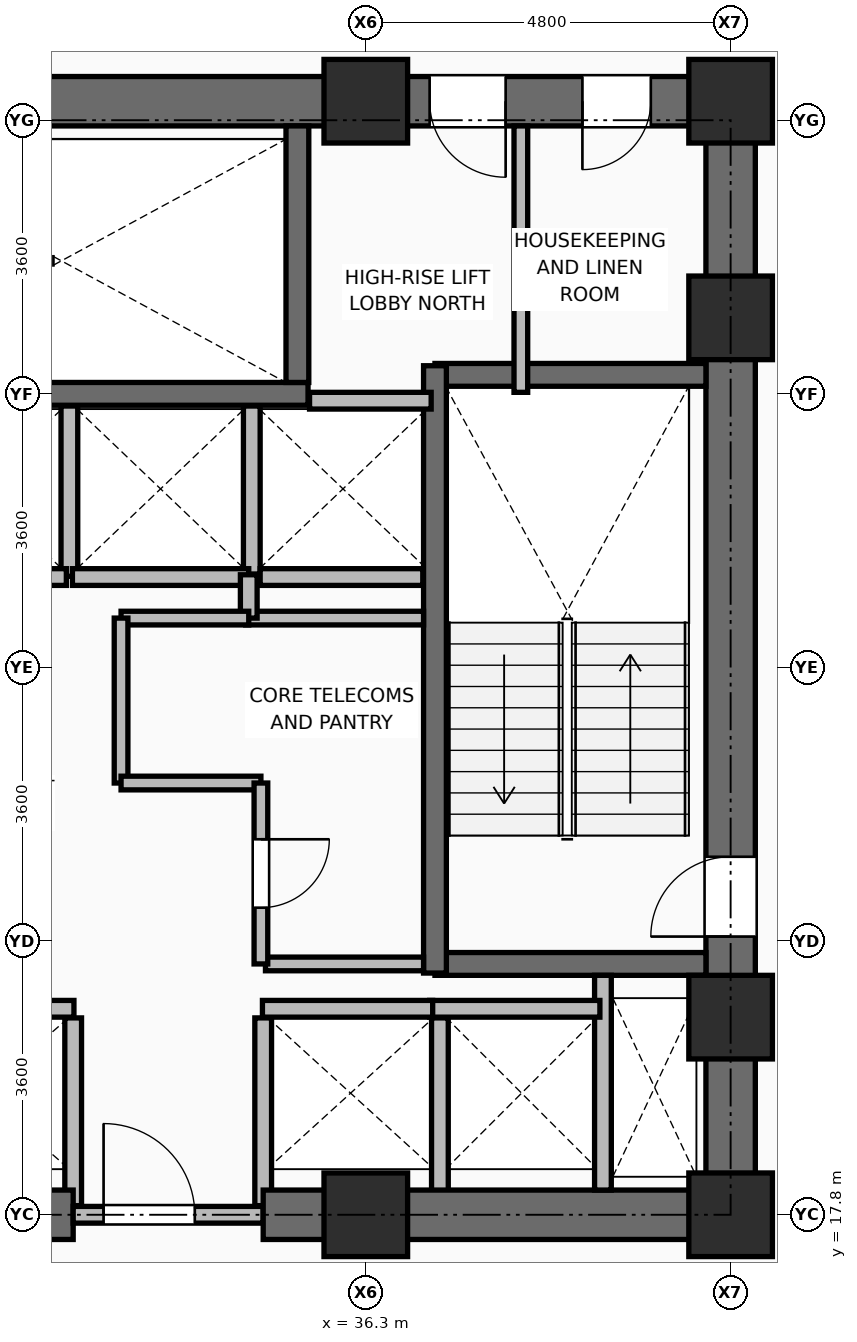
"""IFC4 building model, lengths in metres.
Left out: names, types, materials, properties, quantities, classifications, styles, units other than length and angle.
Written with IfcOpenShell. Run it as: python <this file> out.ifc"""

import sys

from ifc_helpers import new_model, si_unit, direction, frame, frame_2d, origin, origin_2d, place, context, subcontext, project, spatial, rectangle, extrude, element, fill, save


model = new_model("IFC4")
c1 = context("Model", 3, precision=1e-05, world=origin(), true_north=direction((0.0, 1.0)))
c2 = subcontext(c1, "Body", "Model", "MODEL_VIEW")
j1 = project(units=[si_unit("LENGTHUNIT", "METRE"), si_unit("PLANEANGLEUNIT", "RADIAN")], contexts=[c1])
p1 = place(None, origin())
s1 = spatial("IfcSite", under=j1, at=p1, CompositionType="ELEMENT")
p2 = place(p1, origin())
s2 = spatial("IfcBuilding", under=s1, at=p2, CompositionType="ELEMENT")
p3 = place(p2, frame((0.0, 0.0, 53.25)))
s3 = spatial("IfcBuildingStorey", under=s2, at=p3, CompositionType="ELEMENT", Elevation=53.25)
for number, where, z_axis, x_axis in (
    (1, (36.3, 17.8, 0.0), (0.0, 0.0, 1.0), (1.0, 0.0, 0.0)),
    (2, (41.1, 17.8, 0.0), (0.0, 0.0, 1.0), (1.0, 0.0, 0.0)),
    (3, (41.1, 20.4, 0.0), (0.0, 0.0, 1.0), (1.0, 0.0, 0.0)),
    (4, (41.1, 29.6, 0.0), (0.0, 0.0, 1.0), (1.0, 0.0, 0.0)),
    (5, (36.3, 32.45, 0.0), (0.0, 0.0, 1.0), (1.0, 0.0, 0.0)),
    (6, (41.1, 32.45, 0.0), (0.0, 0.0, 1.0), (1.0, 0.0, 0.0)),
):
    element("IfcColumn", number, at=place(p3, frame(where, z_axis=z_axis, x_axis=x_axis)), inside=s3, PredefinedType="COLUMN", context=c2, shape_type="SweptSolid", body=[
        extrude(rectangle(XDim=1.1, YDim=1.1, at=origin_2d()), origin(), (0.0, 0.0, 1.0), 3.75),
    ])
for number, where, z_axis, x_axis in (
    (7, (32.45, 17.92, 0.0), (0.0, 0.0, 1.0), (0.0, 1.0, 0.0)),
    (8, (34.95, 17.92, 0.0), (0.0, 0.0, 1.0), (0.0, 1.0, 0.0)),
):
    element("IfcWall", number, at=place(p3, frame(where, z_axis=z_axis, x_axis=x_axis)), inside=s3, PredefinedType="PARTITIONING", context=c2, shape_type="SweptSolid", body=[
        extrude(rectangle(XDim=2.47, YDim=0.22, at=frame_2d((1.235, 0.0))), origin(), (0.0, 0.0, 1.0), 2.928),
    ])
p4 = place(p3, frame((37.275, 18.08, 0.0), z_axis=(0.0, 0.0, 1.0), x_axis=(0.0, 1.0, 0.0)))
e9 = element("IfcWall", 9, at=p4, inside=s3, PredefinedType="PARTITIONING", context=c2, shape_type="SweptSolid", body=[
    extrude(rectangle(XDim=2.31, YDim=0.22, at=frame_2d((1.155, 0.0))), origin(), (0.0, 0.0, 1.0), 3.545),
])
p5 = place(p3, frame((32.4, 26.2, 0.0), z_axis=(0.0, 0.0, 1.0), x_axis=(0.0, 1.0, 0.0)))
e10 = element("IfcWall", 10, at=p5, inside=s3, PredefinedType="PARTITIONING", context=c2, shape_type="SweptSolid", body=[
    extrude(rectangle(XDim=2.24, YDim=0.22, at=frame_2d((1.12, 0.0))), origin(), (0.0, 0.0, 1.0), 3.545),
])
p6 = place(p3, frame((34.8, 26.23, 0.0), z_axis=(0.0, 0.0, 1.0), x_axis=(0.0, 1.0, 0.0)))
e11 = element("IfcWall", 11, at=p6, inside=s3, PredefinedType="PARTITIONING", context=c2, shape_type="SweptSolid", body=[
    extrude(rectangle(XDim=2.21, YDim=0.22, at=frame_2d((1.105, 0.0))), origin(), (0.0, 0.0, 1.0), 3.545),
])
p7 = place(p3, frame((34.91, 26.19, 0.0), z_axis=(0.0, 0.0, 1.0), x_axis=(1.0, 0.0, 0.0)))
e12 = element("IfcWall", 12, at=p7, inside=s3, PredefinedType="PARTITIONING", context=c2, shape_type="SweptSolid", body=[
    extrude(rectangle(XDim=2.14, YDim=0.22, at=frame_2d((1.07, 0.0))), origin(), (0.0, 0.0, 1.0), 3.545),
])
p8 = place(p3, frame((25.55, 17.8, 0.0), z_axis=(0.0, 0.0, 1.0), x_axis=(1.0, 0.0, 0.0)))
e13 = element("IfcWall", 13, at=p8, inside=s3, PredefinedType="SHEAR", context=c2, shape_type="SweptSolid", body=[
    extrude(rectangle(XDim=6.9, YDim=0.65, at=frame_2d((3.45, 0.0))), origin(), (0.0, 0.0, 1.0), 3.57),
])
p9 = place(p3, frame((32.45, 17.8, 0.0), z_axis=(0.0, 0.0, 1.0), x_axis=(1.0, 0.0, 0.0)))
e14 = element("IfcWall", 14, at=p9, inside=s3, PredefinedType="PARTITIONING", context=c2, shape_type="SweptSolid", body=[
    extrude(rectangle(XDim=2.5, YDim=0.22, at=frame_2d((1.25, 0.0))), origin(), (0.0, 0.0, 1.0), 2.928),
])
p10 = place(p9, frame((0.4, 0.0, 0.0)))
e15 = element("IfcOpeningElement", 15, at=p10, cuts=e14, PredefinedType="OPENING", context=c2, shape_type="SweptSolid", body=[
    extrude(rectangle(XDim=1.2, YDim=2.1, at=frame_2d((0.6, 1.05))), frame((0.0, 0.12, 0.0), z_axis=(0.0, -1.0, 0.0), x_axis=(1.0, 0.0, 0.0)), (0.0, 0.0, 1.0), 0.24),
])
p11 = place(p3, frame((34.95, 17.8, 0.0), z_axis=(0.0, 0.0, 1.0), x_axis=(1.0, 0.0, 0.0)))
e16 = element("IfcWall", 16, at=p11, inside=s3, PredefinedType="SHEAR", context=c2, shape_type="SweptSolid", body=[
    extrude(rectangle(XDim=6.475, YDim=0.65, at=frame_2d((3.238, 0.0))), origin(), (0.0, 0.0, 1.0), 3.57),
])
p12 = place(p3, frame((21.575, 32.45, 0.0), z_axis=(0.0, 0.0, 1.0), x_axis=(1.0, 0.0, 0.0)))
e17 = element("IfcWall", 17, at=p12, inside=s3, PredefinedType="SHEAR", context=c2, shape_type="SweptSolid", body=[
    extrude(rectangle(XDim=19.85, YDim=0.65, at=frame_2d((9.925, 0.0))), origin(), (0.0, 0.0, 1.0), 3.57),
])
p13 = place(p12, frame((2.175, 0.0, 0.0)))
e18 = element("IfcOpeningElement", 18, at=p13, cuts=e17, PredefinedType="OPENING", context=c2, shape_type="SweptSolid", body=[
    extrude(rectangle(XDim=1.1, YDim=2.1, at=frame_2d((0.55, 1.05))), frame((0.0, 0.335, 0.0), z_axis=(0.0, -1.0, 0.0), x_axis=(1.0, 0.0, 0.0)), (0.0, 0.0, 1.0), 0.67),
])
p14 = place(p12, frame((15.565, 0.0, 0.0)))
e19 = element("IfcOpeningElement", 19, at=p14, cuts=e17, PredefinedType="OPENING", context=c2, shape_type="SweptSolid", body=[
    extrude(rectangle(XDim=1.0, YDim=2.1, at=frame_2d((0.5, 1.05))), frame((0.0, 0.335, 0.0), z_axis=(0.0, -1.0, 0.0), x_axis=(1.0, 0.0, 0.0)), (0.0, 0.0, 1.0), 0.67),
])
p15 = place(p12, frame((17.575, 0.0, 0.0)))
e20 = element("IfcOpeningElement", 20, at=p15, cuts=e17, PredefinedType="OPENING", context=c2, shape_type="SweptSolid", body=[
    extrude(rectangle(XDim=0.9, YDim=2.1, at=frame_2d((0.45, 1.05))), frame((0.0, 0.335, 0.0), z_axis=(0.0, -1.0, 0.0), x_axis=(1.0, 0.0, 0.0)), (0.0, 0.0, 1.0), 0.67),
])
p16 = place(p3, frame((41.1, 18.125, 0.0), z_axis=(0.0, 0.0, 1.0), x_axis=(0.0, 1.0, 0.0)))
e21 = element("IfcWall", 21, at=p16, inside=s3, PredefinedType="SHEAR", context=c2, shape_type="SweptSolid", body=[
    extrude(rectangle(XDim=14.0, YDim=0.65, at=frame_2d((7.0, 0.0))), origin(), (0.0, 0.0, 1.0), 3.57),
])
p17 = place(p16, frame((3.335, 0.0, 0.0)))
e22 = element("IfcOpeningElement", 22, at=p17, cuts=e21, PredefinedType="OPENING", context=c2, shape_type="SweptSolid", body=[
    extrude(rectangle(XDim=1.05, YDim=2.1, at=frame_2d((0.525, 1.05))), frame((0.0, 0.335, 0.0), z_axis=(0.0, -1.0, 0.0), x_axis=(1.0, 0.0, 0.0)), (0.0, 0.0, 1.0), 0.67),
])
for number, where, z_axis, x_axis in (
    (23, (37.21, 21.1, 0.0), (0.0, 0.0, 1.0), (1.0, 0.0, 0.0)),
    (24, (37.21, 28.85, 0.0), (0.0, 0.0, 1.0), (1.0, 0.0, 0.0)),
):
    element("IfcWall", number, at=place(p3, frame(where, z_axis=z_axis, x_axis=x_axis)), inside=s3, PredefinedType="SHEAR", context=c2, shape_type="SweptSolid", body=[
        extrude(rectangle(XDim=3.565, YDim=0.3, at=frame_2d((1.782, 0.0))), origin(), (0.0, 0.0, 1.0), 3.57),
    ])
p18 = place(p3, frame((37.21, 20.98, 0.0), z_axis=(0.0, 0.0, 1.0), x_axis=(0.0, 1.0, 0.0)))
e25 = element("IfcWall", 25, at=p18, inside=s3, PredefinedType="SHEAR", context=c2, shape_type="SweptSolid", body=[
    extrude(rectangle(XDim=7.99, YDim=0.3, at=frame_2d((3.995, 0.0))), origin(), (0.0, 0.0, 1.0), 3.57),
])
p19 = place(p3, frame((27.51, 28.6, 0.0), z_axis=(0.0, 0.0, 1.0), x_axis=(1.0, 0.0, 0.0)))
e26 = element("IfcWall", 26, at=p19, inside=s3, PredefinedType="SHEAR", context=c2, shape_type="SweptSolid", body=[
    extrude(rectangle(XDim=8.03, YDim=0.3, at=frame_2d((4.015, 0.0))), origin(), (0.0, 0.0, 1.0), 3.57),
])
p20 = place(p3, frame((35.4, 28.75, 0.0), z_axis=(0.0, 0.0, 1.0), x_axis=(0.0, 1.0, 0.0)))
e27 = element("IfcWall", 27, at=p20, inside=s3, PredefinedType="SHEAR", context=c2, shape_type="SweptSolid", body=[
    extrude(rectangle(XDim=3.375, YDim=0.3, at=frame_2d((1.688, 0.0))), origin(), (0.0, 0.0, 1.0), 3.57),
])
p21 = place(p3, frame((39.42, 18.125, 0.0), z_axis=(0.0, 0.0, 1.0), x_axis=(0.0, 1.0, 0.0)))
e28 = element("IfcWall", 28, at=p21, inside=s3, PredefinedType="PARTITIONING", context=c2, shape_type="SweptSolid", body=[
    extrude(rectangle(XDim=2.825, YDim=0.22, at=frame_2d((1.413, 0.0))), origin(), (0.0, 0.0, 1.0), 3.55),
])
p22 = place(p3, frame((30.04, 20.51, 0.0), z_axis=(0.0, 0.0, 1.0), x_axis=(1.0, 0.0, 0.0)))
e29 = element("IfcWall", 29, at=p22, inside=s3, PredefinedType="PARTITIONING", context=c2, shape_type="SweptSolid", body=[
    extrude(rectangle(XDim=2.42, YDim=0.22, at=frame_2d((1.21, 0.0))), origin(), (0.0, 0.0, 1.0), 3.55),
])
for number, where, z_axis, x_axis in (
    (30, (37.14, 20.51, 0.0), (0.0, 0.0, 1.0), (1.0, 0.0, 0.0)),
    (31, (34.94, 20.51, 0.0), (0.0, 0.0, 1.0), (1.0, 0.0, 0.0)),
):
    element("IfcWall", number, at=place(p3, frame(where, z_axis=z_axis, x_axis=x_axis)), inside=s3, PredefinedType="PARTITIONING", context=c2, shape_type="SweptSolid", body=[
        extrude(rectangle(XDim=2.24, YDim=0.22, at=frame_2d((1.12, 0.0))), origin(), (0.0, 0.0, 1.0), 3.55),
    ])
for number, where, z_axis, x_axis in (
    (32, (30.04, 26.19, 0.0), (0.0, 0.0, 1.0), (1.0, 0.0, 0.0)),
    (33, (32.44, 26.19, 0.0), (0.0, 0.0, 1.0), (1.0, 0.0, 0.0)),
):
    element("IfcWall", number, at=place(p3, frame(where, z_axis=z_axis, x_axis=x_axis)), inside=s3, PredefinedType="PARTITIONING", context=c2, shape_type="SweptSolid", body=[
        extrude(rectangle(XDim=2.32, YDim=0.22, at=frame_2d((1.16, 0.0))), origin(), (0.0, 0.0, 1.0), 3.55),
    ])
p23 = place(p3, frame((35.56, 28.51, 0.0), z_axis=(0.0, 0.0, 1.0), x_axis=(1.0, 0.0, 0.0)))
e34 = element("IfcWall", 34, at=p23, inside=s3, PredefinedType="PARTITIONING", context=c2, shape_type="SweptSolid", body=[
    extrude(rectangle(XDim=1.6, YDim=0.22, at=frame_2d((0.8, 0.0))), origin(), (0.0, 0.0, 1.0), 3.55),
])
p24 = place(p3, frame((34.98, 21.1, 0.0), z_axis=(0.0, 0.0, 1.0), x_axis=(1.0, 0.0, 0.0)))
e35 = element("IfcWall", 35, at=p24, inside=s3, PredefinedType="PARTITIONING", context=c2, shape_type="SweptSolid", body=[
    extrude(rectangle(XDim=2.08, YDim=0.18, at=frame_2d((1.04, 0.0))), origin(), (0.0, 0.0, 1.0), 3.55),
])
p25 = place(p3, frame((34.72, 25.65, 0.0), z_axis=(0.0, 0.0, 1.0), x_axis=(1.0, 0.0, 0.0)))
e36 = element("IfcWall", 36, at=p25, inside=s3, PredefinedType="PARTITIONING", context=c2, shape_type="SweptSolid", body=[
    extrude(rectangle(XDim=2.34, YDim=0.18, at=frame_2d((1.17, 0.0))), origin(), (0.0, 0.0, 1.0), 3.55),
])
p26 = place(p3, frame((34.76, 25.65, 0.0), z_axis=(0.0, 0.0, 1.0), x_axis=(0.0, 1.0, 0.0)))
e37 = element("IfcWall", 37, at=p26, inside=s3, PredefinedType="PARTITIONING", context=c2, shape_type="SweptSolid", body=[
    extrude(rectangle(XDim=0.57, YDim=0.22, at=frame_2d((0.285, 0.0))), origin(), (0.0, 0.0, 1.0), 3.55),
])
p27 = place(p3, frame((33.08, 25.65, 0.0), z_axis=(0.0, 0.0, 1.0), x_axis=(1.0, 0.0, 0.0)))
e38 = element("IfcWall", 38, at=p27, inside=s3, PredefinedType="PARTITIONING", context=c2, shape_type="SweptSolid", body=[
    extrude(rectangle(XDim=1.68, YDim=0.18, at=frame_2d((0.84, 0.0))), origin(), (0.0, 0.0, 1.0), 3.55),
])
p28 = place(p3, frame((33.08, 23.48, 0.0), z_axis=(0.0, 0.0, 1.0), x_axis=(0.0, 1.0, 0.0)))
e39 = element("IfcWall", 39, at=p28, inside=s3, PredefinedType="PARTITIONING", context=c2, shape_type="SweptSolid", body=[
    extrude(rectangle(XDim=2.17, YDim=0.18, at=frame_2d((1.085, 0.0))), origin(), (0.0, 0.0, 1.0), 3.55),
])
p29 = place(p3, frame((33.08, 23.48, 0.0), z_axis=(0.0, 0.0, 1.0), x_axis=(1.0, 0.0, 0.0)))
e40 = element("IfcWall", 40, at=p29, inside=s3, PredefinedType="PARTITIONING", context=c2, shape_type="SweptSolid", body=[
    extrude(rectangle(XDim=1.84, YDim=0.18, at=frame_2d((0.92, 0.0))), origin(), (0.0, 0.0, 1.0), 3.55),
])
p30 = place(p3, frame((34.92, 21.1, 0.0), z_axis=(0.0, 0.0, 1.0), x_axis=(0.0, 1.0, 0.0)))
e41 = element("IfcWall", 41, at=p30, inside=s3, PredefinedType="PARTITIONING", context=c2, shape_type="SweptSolid", body=[
    extrude(rectangle(XDim=2.38, YDim=0.18, at=frame_2d((1.19, 0.0))), origin(), (0.0, 0.0, 1.0), 3.55),
])
p31 = place(p30, frame((0.74, 0.0, 0.0)))
e42 = element("IfcOpeningElement", 42, at=p31, cuts=e41, PredefinedType="OPENING", context=c2, shape_type="SweptSolid", body=[
    extrude(rectangle(XDim=0.9, YDim=2.1, at=frame_2d((0.45, 1.05))), frame((0.0, 0.1, 0.0), z_axis=(0.0, -1.0, 0.0), x_axis=(1.0, 0.0, 0.0)), (0.0, 0.0, 1.0), 0.2),
])
p32 = place(p3, frame((38.34, 28.62, 0.0), z_axis=(0.0, 0.0, 1.0), x_axis=(0.0, 1.0, 0.0)))
e43 = element("IfcWall", 43, at=p32, inside=s3, PredefinedType="PARTITIONING", context=c2, shape_type="SweptSolid", body=[
    extrude(rectangle(XDim=3.505, YDim=0.18, at=frame_2d((1.752, 0.0))), origin(), (0.0, 0.0, 1.0), 3.55),
])
p33 = place(p10, origin())
e44 = element("IfcDoor", 44, at=p33, inside=s3, OperationType="SINGLE_SWING_LEFT", PredefinedType="DOOR", context=c2, shape_type="SweptSolid", body=[
    extrude(rectangle(XDim=1.2, YDim=2.1, at=frame_2d((0.6, 1.05))), frame((0.0, 0.025, 0.0), z_axis=(0.0, -1.0, 0.0), x_axis=(1.0, 0.0, 0.0)), (0.0, 0.0, 1.0), 0.05),
])
fill(e15, e44)
p34 = place(p17, origin())
e45 = element("IfcDoor", 45, at=p34, inside=s3, OperationType="SINGLE_SWING_LEFT", PredefinedType="DOOR", context=c2, shape_type="SweptSolid", body=[
    extrude(rectangle(XDim=1.05, YDim=2.1, at=frame_2d((0.525, 1.05))), frame((0.0, 0.025, 0.0), z_axis=(0.0, -1.0, 0.0), x_axis=(1.0, 0.0, 0.0)), (0.0, 0.0, 1.0), 0.05),
])
fill(e22, e45)
p35 = place(p31, frame((0.9, 0.0, 0.0), z_axis=(0.0, 0.0, 1.0), x_axis=(-1.0, 0.0, 0.0)))
e46 = element("IfcDoor", 46, at=p35, inside=s3, OperationType="SINGLE_SWING_LEFT", PredefinedType="DOOR", context=c2, shape_type="SweptSolid", body=[
    extrude(rectangle(XDim=0.9, YDim=2.1, at=frame_2d((0.45, 1.05))), frame((0.0, 0.025, 0.0), z_axis=(0.0, -1.0, 0.0), x_axis=(1.0, 0.0, 0.0)), (0.0, 0.0, 1.0), 0.05),
])
fill(e42, e46)
p36 = place(p14, frame((1.0, 0.0, 0.0), z_axis=(0.0, 0.0, 1.0), x_axis=(-1.0, 0.0, 0.0)))
e47 = element("IfcDoor", 47, at=p36, inside=s3, OperationType="SINGLE_SWING_LEFT", PredefinedType="DOOR", context=c2, shape_type="SweptSolid", body=[
    extrude(rectangle(XDim=1.0, YDim=2.1, at=frame_2d((0.5, 1.05))), frame((0.0, 0.025, 0.0), z_axis=(0.0, -1.0, 0.0), x_axis=(1.0, 0.0, 0.0)), (0.0, 0.0, 1.0), 0.05),
])
fill(e19, e47)
p37 = place(p15, frame((0.9, 0.0, 0.0), z_axis=(0.0, 0.0, 1.0), x_axis=(-1.0, 0.0, 0.0)))
e48 = element("IfcDoor", 48, at=p37, inside=s3, OperationType="SINGLE_SWING_RIGHT", PredefinedType="DOOR", context=c2, shape_type="SweptSolid", body=[
    extrude(rectangle(XDim=0.9, YDim=2.1, at=frame_2d((0.45, 1.05))), frame((0.0, 0.025, 0.0), z_axis=(0.0, -1.0, 0.0), x_axis=(1.0, 0.0, 0.0)), (0.0, 0.0, 1.0), 0.05),
])
fill(e20, e48)
save(model, sys.argv[1])
